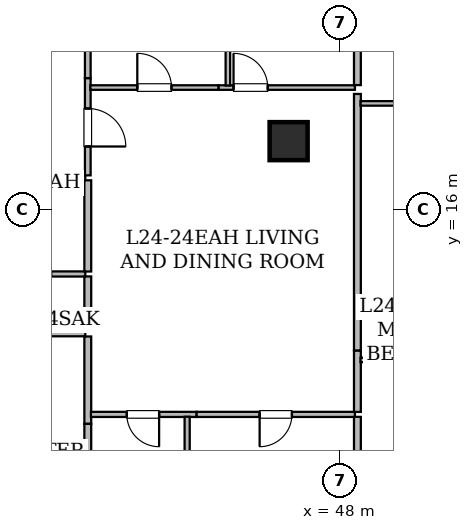
"""IFC4 building model, lengths in metres.
Left out: names, types, materials, properties, quantities, classifications, styles, units other than length and angle.
Written with IfcOpenShell. Run it as: python <this file> out.ifc"""

import sys

from ifc_helpers import new_model, si_unit, direction, frame, frame_2d, origin, origin_2d, place, context, subcontext, project, spatial, rectangle, hollow_rectangle, extrude, element, fill, save


model = new_model("IFC4")
c1 = context("Model", 3, precision=1e-05, world=origin(), true_north=direction((0.0, 1.0)))
c2 = subcontext(c1, "Body", "Model", "MODEL_VIEW")
j1 = project(units=[si_unit("LENGTHUNIT", "METRE"), si_unit("PLANEANGLEUNIT", "RADIAN")], contexts=[c1])
p1 = place(None, origin())
s1 = spatial("IfcSite", under=j1, at=p1, CompositionType="ELEMENT")
p2 = place(p1, origin())
s2 = spatial("IfcBuilding", under=s1, at=p2, CompositionType="ELEMENT")
p3 = place(p2, frame((0.0, 0.0, 98.25)))
s3 = spatial("IfcBuildingStorey", under=s2, at=p3, CompositionType="ELEMENT", Elevation=98.25)
p4 = place(p3, frame((46.65, 17.8, 0.0), z_axis=(0.0, 0.0, 1.0), x_axis=(1.0, 0.0, 0.0)))
e1 = element("IfcColumn", 1, at=p4, inside=s3, PredefinedType="COLUMN", context=c2, shape_type="SweptSolid", body=[
    extrude(hollow_rectangle(XDim=1.0, YDim=1.0, WallThickness=0.05, at=origin_2d()), origin(), (0.0, 0.0, 1.0), 3.65),
])
p5 = place(p3, frame((41.3, 16.835, 0.0), z_axis=(0.0, 0.0, 1.0), x_axis=(-1.0, 0.0, 0.0)))
e2 = element("IfcWall", 2, at=p5, inside=s3, PredefinedType="STANDARD", context=c2, shape_type="SweptSolid", body=[
    extrude(rectangle(XDim=2.336, YDim=0.15, at=frame_2d((1.168, 0.0))), origin(), (0.0, 0.0, 1.0), 2.647),
])
p6 = place(p3, frame((41.365, 19.459, 0.0), z_axis=(0.0, 0.0, 1.0), x_axis=(0.0, -1.0, 0.0)))
e3 = element("IfcWall", 3, at=p6, inside=s3, PredefinedType="STANDARD", context=c2, shape_type="SweptSolid", body=[
    extrude(rectangle(XDim=2.559, YDim=0.15, at=frame_2d((1.28, 0.0))), origin(), (0.0, 0.0, 1.0), 2.647),
])
p7 = place(p6, frame((0.8, 0.0, 0.0)))
e4 = element("IfcOpeningElement", 4, at=p7, cuts=e3, PredefinedType="OPENING", context=c2, shape_type="SweptSolid", body=[
    extrude(rectangle(XDim=1.0, YDim=2.15, at=frame_2d((0.5, 1.075))), frame((0.0, 0.085, 0.0), z_axis=(0.0, -1.0, 0.0), x_axis=(1.0, 0.0, 0.0)), (0.0, 0.0, 1.0), 0.17),
])
p8 = place(p3, frame((41.365, 32.048, 0.0), z_axis=(0.0, 0.0, 1.0), x_axis=(0.0, -1.0, 0.0)))
e5 = element("IfcWall", 5, at=p8, inside=s3, PredefinedType="STANDARD", context=c2, shape_type="SweptSolid", body=[
    extrude(rectangle(XDim=12.589, YDim=0.15, at=frame_2d((6.294, 0.0))), origin(), (0.0, 0.0, 1.0), 2.961),
])
p9 = place(p3, frame((38.65, 14.305, 0.0), z_axis=(0.0, 0.0, 1.0), x_axis=(1.0, 0.0, 0.0)))
e6 = element("IfcWall", 6, at=p9, inside=s3, PredefinedType="PARTITIONING", context=c2, shape_type="SweptSolid", body=[
    extrude(rectangle(XDim=2.65, YDim=0.135, at=frame_2d((1.325, 0.0))), origin(), (0.0, 0.0, 1.0), 2.647),
])
p10 = place(p9, frame((0.9, 0.0, 0.0)))
e7 = element("IfcOpeningElement", 7, at=p10, cuts=e6, PredefinedType="OPENING", context=c2, shape_type="SweptSolid", body=[
    extrude(rectangle(XDim=0.85, YDim=2.1, at=frame_2d((0.425, 1.05))), frame((0.0, 0.077, 0.0), z_axis=(0.0, -1.0, 0.0), x_axis=(1.0, 0.0, 0.0)), (0.0, 0.0, 1.0), 0.155),
])
p11 = place(p3, frame((41.3, 12.725, 0.0), z_axis=(0.0, 0.0, 1.0), x_axis=(-1.0, 0.0, 0.0)))
e8 = element("IfcWall", 8, at=p11, inside=s3, PredefinedType="PARTITIONING", context=c2, shape_type="SweptSolid", body=[
    extrude(rectangle(XDim=7.381, YDim=0.12, at=frame_2d((3.69, 0.0))), origin(), (0.0, 0.0, 1.0), 2.647),
])
p12 = place(p11, frame((3.24, 0.0, 0.0)))
e9 = element("IfcOpeningElement", 9, at=p12, cuts=e8, PredefinedType="OPENING", context=c2, shape_type="SweptSolid", body=[
    extrude(rectangle(XDim=0.9, YDim=2.1, at=frame_2d((0.45, 1.05))), frame((0.0, 0.07, 0.0), z_axis=(0.0, -1.0, 0.0), x_axis=(1.0, 0.0, 0.0)), (0.0, 0.0, 1.0), 0.14),
])
p13 = place(p3, frame((41.365, 14.24, 0.0), z_axis=(0.0, 0.0, 1.0), x_axis=(0.0, -1.0, 0.0)))
e10 = element("IfcWall", 10, at=p13, inside=s3, PredefinedType="STANDARD", context=c2, shape_type="SweptSolid", body=[
    extrude(rectangle(XDim=1.45, YDim=0.18, at=frame_2d((0.725, 0.0))), origin(), (0.0, 0.0, 1.0), 3.43),
])
p14 = place(p3, frame((41.365, 16.77, 0.0), z_axis=(0.0, 0.0, 1.0), x_axis=(0.0, -1.0, 0.0)))
e11 = element("IfcWall", 11, at=p14, inside=s3, PredefinedType="STANDARD", context=c2, shape_type="SweptSolid", body=[
    extrude(rectangle(XDim=2.4, YDim=0.18, at=frame_2d((1.2, 0.0))), origin(), (0.0, 0.0, 1.0), 3.43),
])
p15 = place(p3, frame((41.365, 12.66, 0.0), z_axis=(0.0, 0.0, 1.0), x_axis=(0.0, -1.0, 0.0)))
e12 = element("IfcWall", 12, at=p15, inside=s3, PredefinedType="STANDARD", context=c2, shape_type="SweptSolid", body=[
    extrude(rectangle(XDim=2.299, YDim=0.18, at=frame_2d((1.149, 0.0))), origin(), (0.0, 0.0, 1.0), 3.43),
])
p16 = place(p3, frame((41.365, 10.361, 0.0), z_axis=(0.0, 0.0, 1.0), x_axis=(0.0, -1.0, 0.0)))
e13 = element("IfcWall", 13, at=p16, inside=s3, PredefinedType="STANDARD", context=c2, shape_type="SweptSolid", body=[
    extrude(rectangle(XDim=3.749, YDim=0.18, at=frame_2d((1.875, 0.0))), origin(), (0.0, 0.0, 1.0), 2.876),
])
p17 = place(p3, frame((44.803, 19.21, 0.0), z_axis=(0.0, 0.0, 1.0), x_axis=(1.0, 0.0, 0.0)))
e14 = element("IfcWall", 14, at=p17, inside=s3, PredefinedType="PARTITIONING", context=c2, shape_type="SweptSolid", body=[
    extrude(rectangle(XDim=3.592, YDim=0.12, at=frame_2d((1.796, 0.0))), origin(), (0.0, 0.0, 1.0), 2.647),
])
p18 = place(p17, frame((0.397, 0.0, 0.0)))
e15 = element("IfcOpeningElement", 15, at=p18, cuts=e14, PredefinedType="OPENING", context=c2, shape_type="SweptSolid", body=[
    extrude(rectangle(XDim=0.9, YDim=2.1, at=frame_2d((0.45, 1.05))), frame((0.0, 0.07, 0.0), z_axis=(0.0, -1.0, 0.0), x_axis=(1.0, 0.0, 0.0)), (0.0, 0.0, 1.0), 0.14),
])
p19 = place(p3, frame((44.229, 10.61, 0.0), z_axis=(0.0, 0.0, 1.0), x_axis=(-1.0, 0.0, 0.0)))
e16 = element("IfcWall", 16, at=p19, inside=s3, PredefinedType="PARTITIONING", context=c2, shape_type="SweptSolid", body=[
    extrude(rectangle(XDim=2.782, YDim=0.135, at=frame_2d((1.391, 0.0))), origin(), (0.0, 0.0, 1.0), 3.43),
])
p20 = place(p19, frame((0.987, 0.0, 0.0)))
e17 = element("IfcOpeningElement", 17, at=p20, cuts=e16, PredefinedType="OPENING", context=c2, shape_type="SweptSolid", body=[
    extrude(rectangle(XDim=0.85, YDim=2.1, at=frame_2d((0.425, 1.05))), frame((0.0, 0.077, 0.0), z_axis=(0.0, -1.0, 0.0), x_axis=(1.0, 0.0, 0.0)), (0.0, 0.0, 1.0), 0.155),
])
p21 = place(p3, frame((48.395, 10.61, 0.0), z_axis=(0.0, 0.0, 1.0), x_axis=(-1.0, 0.0, 0.0)))
e18 = element("IfcWall", 18, at=p21, inside=s3, PredefinedType="PARTITIONING", context=c2, shape_type="SweptSolid", body=[
    extrude(rectangle(XDim=4.166, YDim=0.135, at=frame_2d((2.083, 0.0))), origin(), (0.0, 0.0, 1.0), 3.43),
])
p22 = place(p21, frame((1.658, 0.0, 0.0)))
e19 = element("IfcOpeningElement", 19, at=p22, cuts=e18, PredefinedType="OPENING", context=c2, shape_type="SweptSolid", body=[
    extrude(rectangle(XDim=0.85, YDim=2.1, at=frame_2d((0.425, 1.05))), frame((0.0, 0.077, 0.0), z_axis=(0.0, -1.0, 0.0), x_axis=(1.0, 0.0, 0.0)), (0.0, 0.0, 1.0), 0.155),
])
p23 = place(p3, frame((41.432, 19.21, 0.0), z_axis=(0.0, 0.0, 1.0), x_axis=(1.0, 0.0, 0.0)))
e20 = element("IfcWall", 20, at=p23, inside=s3, PredefinedType="PARTITIONING", context=c2, shape_type="SweptSolid", body=[
    extrude(rectangle(XDim=3.371, YDim=0.12, at=frame_2d((1.686, 0.0))), origin(), (0.0, 0.0, 1.0), 3.43),
])
p24 = place(p23, frame((1.236, 0.0, 0.0)))
e21 = element("IfcOpeningElement", 21, at=p24, cuts=e20, PredefinedType="OPENING", context=c2, shape_type="SweptSolid", body=[
    extrude(rectangle(XDim=0.9, YDim=2.1, at=frame_2d((0.45, 1.05))), frame((0.0, 0.07, 0.0), z_axis=(0.0, -1.0, 0.0), x_axis=(1.0, 0.0, 0.0)), (0.0, 0.0, 1.0), 0.14),
])
p25 = place(p3, frame((48.46, 12.292, 0.0), z_axis=(0.0, 0.0, 1.0), x_axis=(0.0, -1.0, 0.0)))
e22 = element("IfcWall", 22, at=p25, inside=s3, PredefinedType="STANDARD", context=c2, shape_type="SweptSolid", body=[
    extrude(rectangle(XDim=1.617, YDim=0.18, at=frame_2d((0.809, 0.0))), origin(), (0.0, 0.0, 1.0), 2.647),
])
p26 = place(p3, frame((48.46, 19.042, 0.0), z_axis=(0.0, 0.0, 1.0), x_axis=(0.0, -1.0, 0.0)))
e23 = element("IfcWall", 23, at=p26, inside=s3, PredefinedType="STANDARD", context=c2, shape_type="SweptSolid", body=[
    extrude(rectangle(XDim=6.75, YDim=0.18, at=frame_2d((3.375, 0.0))), origin(), (0.0, 0.0, 1.0), 2.647),
])
p27 = place(p3, frame((45.052, 19.264, 0.0), z_axis=(0.0, 0.0, 1.0), x_axis=(0.0, 1.0, 0.0)))
e24 = element("IfcWall", 24, at=p27, inside=s3, PredefinedType="PARTITIONING", context=c2, shape_type="SweptSolid", body=[
    extrude(rectangle(XDim=12.654, YDim=0.12, at=frame_2d((6.327, 0.0))), origin(), (0.0, 0.0, 1.0), 2.961),
])
p28 = place(p3, frame((48.46, 26.576, 0.0), z_axis=(0.0, 0.0, 1.0), x_axis=(0.0, -1.0, 0.0)))
e25 = element("IfcWall", 25, at=p28, inside=s3, PredefinedType="STANDARD", context=c2, shape_type="SweptSolid", body=[
    extrude(rectangle(XDim=7.301, YDim=0.18, at=frame_2d((3.65, 0.0))), origin(), (0.0, 0.0, 1.0), 2.687),
])
p29 = place(p3, frame((43.98, 10.548, 0.0), z_axis=(0.0, 0.0, 1.0), x_axis=(0.0, -1.0, 0.0)))
e26 = element("IfcWall", 26, at=p29, inside=s3, PredefinedType="PARTITIONING", context=c2, shape_type="SweptSolid", body=[
    extrude(rectangle(XDim=3.936, YDim=0.135, at=frame_2d((1.968, 0.0))), origin(), (0.0, 0.0, 1.0), 2.876),
])
p30 = place(p3, frame((48.46, 10.545, 0.0), z_axis=(0.0, 0.0, 1.0), x_axis=(0.0, -1.0, 0.0)))
e27 = element("IfcWall", 27, at=p30, inside=s3, PredefinedType="STANDARD", context=c2, shape_type="SweptSolid", body=[
    extrude(rectangle(XDim=3.933, YDim=0.18, at=frame_2d((1.966, 0.0))), origin(), (0.0, 0.0, 1.0), 2.876),
])
p31 = place(p3, frame((48.542, 12.043, 0.0), z_axis=(0.0, 0.0, 1.0), x_axis=(1.0, 0.0, 0.0)))
e28 = element("IfcWall", 28, at=p31, inside=s3, PredefinedType="PARTITIONING", context=c2, shape_type="SweptSolid", body=[
    extrude(rectangle(XDim=3.127, YDim=0.12, at=frame_2d((1.563, 0.0))), origin(), (0.0, 0.0, 1.0), 2.647),
])
p32 = place(p3, frame((48.542, 18.793, 0.0), z_axis=(0.0, 0.0, 1.0), x_axis=(1.0, 0.0, 0.0)))
e29 = element("IfcWall", 29, at=p32, inside=s3, PredefinedType="PARTITIONING", context=c2, shape_type="SweptSolid", body=[
    extrude(rectangle(XDim=3.127, YDim=0.12, at=frame_2d((1.563, 0.0))), origin(), (0.0, 0.0, 1.0), 2.687),
])
p33 = place(p7, origin())
e30 = element("IfcDoor", 30, at=p33, inside=s3, OperationType="SINGLE_SWING_RIGHT", PredefinedType="DOOR", context=c2, shape_type="SweptSolid", body=[
    extrude(rectangle(XDim=1.0, YDim=2.15, at=frame_2d((0.5, 1.075))), frame((0.0, 0.025, 0.0), z_axis=(0.0, -1.0, 0.0), x_axis=(1.0, 0.0, 0.0)), (0.0, 0.0, 1.0), 0.05),
])
fill(e4, e30)
p34 = place(p18, origin())
e31 = element("IfcDoor", 31, at=p34, inside=s3, OperationType="SINGLE_SWING_LEFT", PredefinedType="DOOR", context=c2, shape_type="SweptSolid", body=[
    extrude(rectangle(XDim=0.9, YDim=2.1, at=frame_2d((0.45, 1.05))), frame((0.0, 0.025, 0.0), z_axis=(0.0, -1.0, 0.0), x_axis=(1.0, 0.0, 0.0)), (0.0, 0.0, 1.0), 0.05),
])
fill(e15, e31)
p35 = place(p20, origin())
e32 = element("IfcDoor", 32, at=p35, inside=s3, OperationType="SINGLE_SWING_LEFT", PredefinedType="DOOR", context=c2, shape_type="SweptSolid", body=[
    extrude(rectangle(XDim=0.85, YDim=2.1, at=frame_2d((0.425, 1.05))), frame((0.0, 0.025, 0.0), z_axis=(0.0, -1.0, 0.0), x_axis=(1.0, 0.0, 0.0)), (0.0, 0.0, 1.0), 0.05),
])
fill(e17, e32)
p36 = place(p22, origin())
e33 = element("IfcDoor", 33, at=p36, inside=s3, OperationType="SINGLE_SWING_RIGHT", PredefinedType="DOOR", context=c2, shape_type="SweptSolid", body=[
    extrude(rectangle(XDim=0.85, YDim=2.1, at=frame_2d((0.425, 1.05))), frame((0.0, 0.025, 0.0), z_axis=(0.0, -1.0, 0.0), x_axis=(1.0, 0.0, 0.0)), (0.0, 0.0, 1.0), 0.05),
])
fill(e19, e33)
p37 = place(p24, origin())
e34 = element("IfcDoor", 34, at=p37, inside=s3, OperationType="SINGLE_SWING_LEFT", PredefinedType="DOOR", context=c2, shape_type="SweptSolid", body=[
    extrude(rectangle(XDim=0.9, YDim=2.1, at=frame_2d((0.45, 1.05))), frame((0.0, 0.025, 0.0), z_axis=(0.0, -1.0, 0.0), x_axis=(1.0, 0.0, 0.0)), (0.0, 0.0, 1.0), 0.05),
])
fill(e21, e34)
save(model, sys.argv[1])
